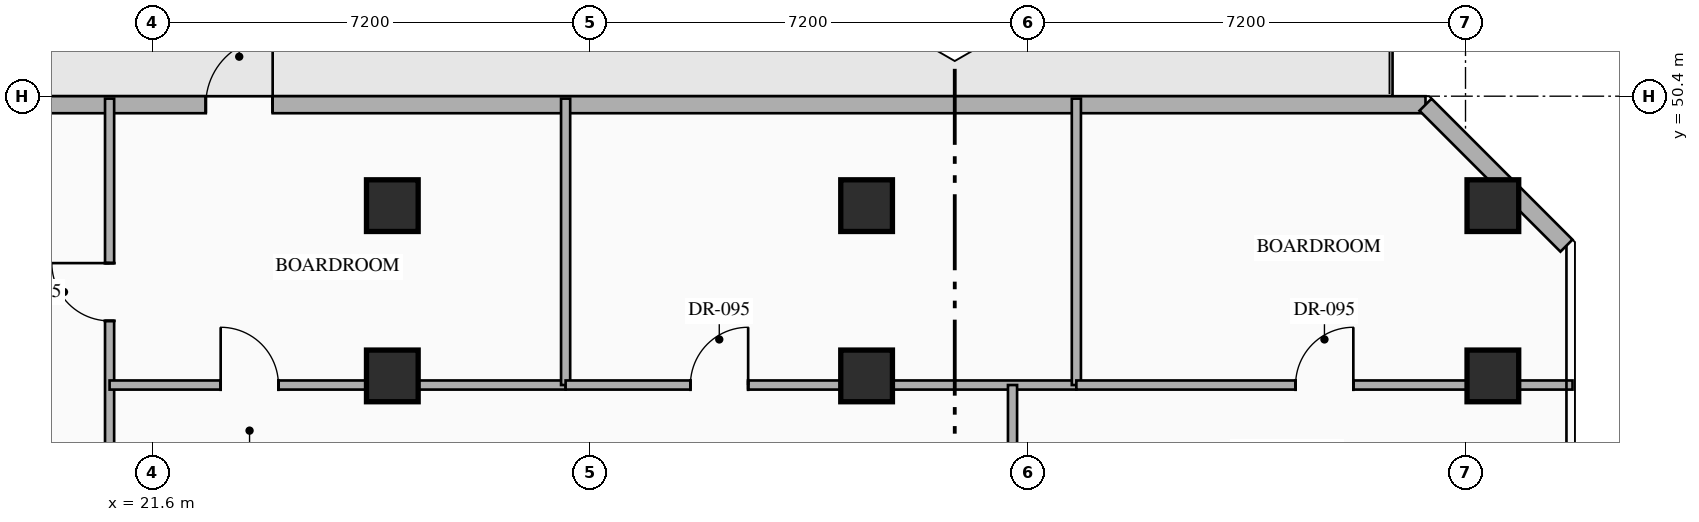
"""IFC4 building model, lengths in metres.
Left out: names, types, materials, properties, quantities, classifications, styles, units other than length and angle.
Written with IfcOpenShell. Run it as: python <this file> out.ifc"""

import sys

from ifc_helpers import new_model, si_unit, direction, frame, frame_2d, origin, origin_2d, place, context, subcontext, project, spatial, rectangle, hollow_rectangle, extrude, element, fill, save


model = new_model("IFC4")
c1 = context("Model", 3, precision=1e-05, world=origin(), true_north=direction((0.0, 1.0)))
c2 = subcontext(c1, "Body", "Model", "MODEL_VIEW")
j1 = project(units=[si_unit("LENGTHUNIT", "METRE"), si_unit("PLANEANGLEUNIT", "RADIAN")], contexts=[c1])
p1 = place(None, origin())
s1 = spatial("IfcSite", under=j1, at=p1, CompositionType="ELEMENT")
p2 = place(p1, origin())
s2 = spatial("IfcBuilding", under=s1, at=p2, CompositionType="ELEMENT")
p3 = place(p2, frame((0.0, 0.0, 160.05)))
s3 = spatial("IfcBuildingStorey", under=s2, at=p3, CompositionType="ELEMENT", Elevation=160.05)
for number, where, z_axis, x_axis in (
    (1, (25.55, 45.8, 0.0), (0.0, 0.0, 1.0), (1.0, 0.0, 0.0)),
    (2, (33.35, 45.8, 0.0), (0.0, 0.0, 1.0), (1.0, 0.0, 0.0)),
    (3, (43.65, 45.8, 0.0), (0.0, 0.0, 1.0), (1.0, 0.0, 0.0)),
    (4, (25.55, 48.6, 0.0), (0.0, 0.0, 1.0), (1.0, 0.0, 0.0)),
    (5, (33.35, 48.6, 0.0), (0.0, 0.0, 1.0), (1.0, 0.0, 0.0)),
    (6, (43.65, 48.6, 0.0), (0.0, 0.0, 1.0), (1.0, 0.0, 0.0)),
):
    element("IfcColumn", number, at=place(p3, frame(where, z_axis=z_axis, x_axis=x_axis)), inside=s3, PredefinedType="COLUMN", context=c2, shape_type="SweptSolid", body=[
        extrude(hollow_rectangle(XDim=0.85, YDim=0.85, WallThickness=0.032, at=origin_2d()), origin(), (0.0, 0.0, 1.0), 3.6),
    ])
p4 = place(p3, frame((12.058, 50.26, 0.0), z_axis=(0.0, 0.0, 1.0), x_axis=(1.0, 0.0, 0.0)))
e7 = element("IfcWall", 7, at=p4, inside=s3, PredefinedType="STANDARD", context=c2, shape_type="SweptSolid", body=[
    extrude(rectangle(XDim=30.484, YDim=0.28, at=frame_2d((15.242, 0.0))), origin(), (0.0, 0.0, 1.0), 3.35),
])
p5 = place(p4, frame((10.424, 0.0, 0.0)))
e8 = element("IfcOpeningElement", 8, at=p5, cuts=e7, PredefinedType="OPENING", context=c2, shape_type="SweptSolid", body=[
    extrude(rectangle(XDim=1.1, YDim=2.2, at=frame_2d((0.55, 1.1))), frame((0.0, 0.15, 0.0), z_axis=(0.0, -1.0, 0.0), x_axis=(1.0, 0.0, 0.0)), (0.0, 0.0, 1.0), 0.3),
])
p6 = place(p3, frame((42.542, 50.26, 0.0), z_axis=(0.0, 0.0, 1.0), x_axis=(0.707106781187, -0.707106781187, 0.0)))
e9 = element("IfcWall", 9, at=p6, inside=s3, PredefinedType="STANDARD", context=c2, shape_type="SweptSolid", body=[
    extrude(rectangle(XDim=3.278, YDim=0.28, at=frame_2d((1.639, 0.0))), origin(), (0.0, 0.0, 1.0), 3.35),
])
p7 = place(p3, frame((20.9, 44.0, 0.0), z_axis=(0.0, 0.0, 1.0), x_axis=(0.0, 1.0, 0.0)))
e10 = element("IfcWall", 10, at=p7, inside=s3, PredefinedType="PARTITIONING", context=c2, shape_type="SweptSolid", body=[
    extrude(rectangle(XDim=6.36, YDim=0.15, at=frame_2d((3.18, 0.0))), origin(), (0.0, 0.0, 1.0), 3.35),
])
p8 = place(p7, frame((2.705, 0.0, 0.0)))
e11 = element("IfcOpeningElement", 11, at=p8, cuts=e10, PredefinedType="OPENING", context=c2, shape_type="SweptSolid", body=[
    extrude(rectangle(XDim=0.95, YDim=2.15, at=frame_2d((0.475, 1.075))), frame((0.0, 0.085, 0.0), z_axis=(0.0, -1.0, 0.0), x_axis=(1.0, 0.0, 0.0)), (0.0, 0.0, 1.0), 0.17),
])
p9 = place(p3, frame((20.9, 45.65, 0.0), z_axis=(0.0, 0.0, 1.0), x_axis=(1.0, 0.0, 0.0)))
e12 = element("IfcWall", 12, at=p9, inside=s3, PredefinedType="PARTITIONING", context=c2, shape_type="SweptSolid", body=[
    extrude(rectangle(XDim=7.5, YDim=0.15, at=frame_2d((3.75, 0.0))), origin(), (0.0, 0.0, 1.0), 2.695),
])
p10 = place(p9, frame((1.827, 0.0, 0.0)))
e13 = element("IfcOpeningElement", 13, at=p10, cuts=e12, PredefinedType="OPENING", context=c2, shape_type="SweptSolid", body=[
    extrude(rectangle(XDim=0.95, YDim=2.15, at=frame_2d((0.475, 1.075))), frame((0.0, 0.085, 0.0), z_axis=(0.0, -1.0, 0.0), x_axis=(1.0, 0.0, 0.0)), (0.0, 0.0, 1.0), 0.17),
])
p11 = place(p3, frame((28.4, 45.65, 0.0), z_axis=(0.0, 0.0, 1.0), x_axis=(0.0, 1.0, 0.0)))
e14 = element("IfcWall", 14, at=p11, inside=s3, PredefinedType="PARTITIONING", context=c2, shape_type="SweptSolid", body=[
    extrude(rectangle(XDim=4.71, YDim=0.15, at=frame_2d((2.355, 0.0))), origin(), (0.0, 0.0, 1.0), 3.35),
])
p12 = place(p3, frame((28.4, 45.65, 0.0), z_axis=(0.0, 0.0, 1.0), x_axis=(1.0, 0.0, 0.0)))
e15 = element("IfcWall", 15, at=p12, inside=s3, PredefinedType="PARTITIONING", context=c2, shape_type="SweptSolid", body=[
    extrude(rectangle(XDim=8.4, YDim=0.15, at=frame_2d((4.2, 0.0))), origin(), (0.0, 0.0, 1.0), 2.695),
])
p13 = place(p12, frame((2.052, 0.0, 0.0)))
e16 = element("IfcOpeningElement", 16, at=p13, cuts=e15, PredefinedType="OPENING", context=c2, shape_type="SweptSolid", body=[
    extrude(rectangle(XDim=0.95, YDim=2.15, at=frame_2d((0.475, 1.075))), frame((0.0, 0.085, 0.0), z_axis=(0.0, -1.0, 0.0), x_axis=(1.0, 0.0, 0.0)), (0.0, 0.0, 1.0), 0.17),
])
p14 = place(p3, frame((36.8, 45.65, 0.0), z_axis=(0.0, 0.0, 1.0), x_axis=(0.0, 1.0, 0.0)))
e17 = element("IfcWall", 17, at=p14, inside=s3, PredefinedType="PARTITIONING", context=c2, shape_type="SweptSolid", body=[
    extrude(rectangle(XDim=4.71, YDim=0.15, at=frame_2d((2.355, 0.0))), origin(), (0.0, 0.0, 1.0), 3.35),
])
p15 = place(p3, frame((36.8, 45.65, 0.0), z_axis=(0.0, 0.0, 1.0), x_axis=(1.0, 0.0, 0.0)))
e18 = element("IfcWall", 18, at=p15, inside=s3, PredefinedType="PARTITIONING", context=c2, shape_type="SweptSolid", body=[
    extrude(rectangle(XDim=8.16, YDim=0.15, at=frame_2d((4.08, 0.0))), origin(), (0.0, 0.0, 1.0), 2.695),
])
p16 = place(p15, frame((3.605, 0.0, 0.0)))
e19 = element("IfcOpeningElement", 19, at=p16, cuts=e18, PredefinedType="OPENING", context=c2, shape_type="SweptSolid", body=[
    extrude(rectangle(XDim=0.95, YDim=2.15, at=frame_2d((0.475, 1.075))), frame((0.0, 0.085, 0.0), z_axis=(0.0, -1.0, 0.0), x_axis=(1.0, 0.0, 0.0)), (0.0, 0.0, 1.0), 0.17),
])
p17 = place(p3, frame((35.75, 42.55, 0.0), z_axis=(0.0, 0.0, 1.0), x_axis=(0.0, 1.0, 0.0)))
e20 = element("IfcWall", 20, at=p17, inside=s3, PredefinedType="PARTITIONING", context=c2, shape_type="SweptSolid", body=[
    extrude(rectangle(XDim=3.1, YDim=0.15, at=frame_2d((1.55, 0.0))), origin(), (0.0, 0.0, 1.0), 3.35),
])
p18 = place(p17, frame((1.075, 0.0, 0.0)))
e21 = element("IfcOpeningElement", 21, at=p18, cuts=e20, PredefinedType="OPENING", context=c2, shape_type="SweptSolid", body=[
    extrude(rectangle(XDim=0.95, YDim=2.15, at=frame_2d((0.475, 1.075))), frame((0.0, 0.085, 0.0), z_axis=(0.0, -1.0, 0.0), x_axis=(1.0, 0.0, 0.0)), (0.0, 0.0, 1.0), 0.17),
])
p19 = place(p5, origin())
e22 = element("IfcDoor", 22, at=p19, inside=s3, OperationType="SINGLE_SWING_RIGHT", PredefinedType="DOOR", context=c2, shape_type="SweptSolid", body=[
    extrude(rectangle(XDim=1.1, YDim=2.2, at=frame_2d((0.55, 1.1))), frame((0.0, 0.025, 0.0), z_axis=(0.0, -1.0, 0.0), x_axis=(1.0, 0.0, 0.0)), (0.0, 0.0, 1.0), 0.05),
])
fill(e8, e22)
p20 = place(p8, origin())
e23 = element("IfcDoor", 23, at=p20, inside=s3, OperationType="SINGLE_SWING_RIGHT", PredefinedType="DOOR", context=c2, shape_type="SweptSolid", body=[
    extrude(rectangle(XDim=0.95, YDim=2.15, at=frame_2d((0.475, 1.075))), frame((0.0, 0.025, 0.0), z_axis=(0.0, -1.0, 0.0), x_axis=(1.0, 0.0, 0.0)), (0.0, 0.0, 1.0), 0.05),
])
fill(e11, e23)
p21 = place(p10, origin())
e24 = element("IfcDoor", 24, at=p21, inside=s3, OperationType="SINGLE_SWING_LEFT", PredefinedType="DOOR", context=c2, shape_type="SweptSolid", body=[
    extrude(rectangle(XDim=0.95, YDim=2.15, at=frame_2d((0.475, 1.075))), frame((0.0, 0.025, 0.0), z_axis=(0.0, -1.0, 0.0), x_axis=(1.0, 0.0, 0.0)), (0.0, 0.0, 1.0), 0.05),
])
fill(e13, e24)
p22 = place(p13, origin())
e25 = element("IfcDoor", 25, at=p22, inside=s3, OperationType="SINGLE_SWING_RIGHT", PredefinedType="DOOR", context=c2, shape_type="SweptSolid", body=[
    extrude(rectangle(XDim=0.95, YDim=2.15, at=frame_2d((0.475, 1.075))), frame((0.0, 0.025, 0.0), z_axis=(0.0, -1.0, 0.0), x_axis=(1.0, 0.0, 0.0)), (0.0, 0.0, 1.0), 0.05),
])
fill(e16, e25)
p23 = place(p16, origin())
e26 = element("IfcDoor", 26, at=p23, inside=s3, OperationType="SINGLE_SWING_RIGHT", PredefinedType="DOOR", context=c2, shape_type="SweptSolid", body=[
    extrude(rectangle(XDim=0.95, YDim=2.15, at=frame_2d((0.475, 1.075))), frame((0.0, 0.025, 0.0), z_axis=(0.0, -1.0, 0.0), x_axis=(1.0, 0.0, 0.0)), (0.0, 0.0, 1.0), 0.05),
])
fill(e19, e26)
save(model, sys.argv[1])
